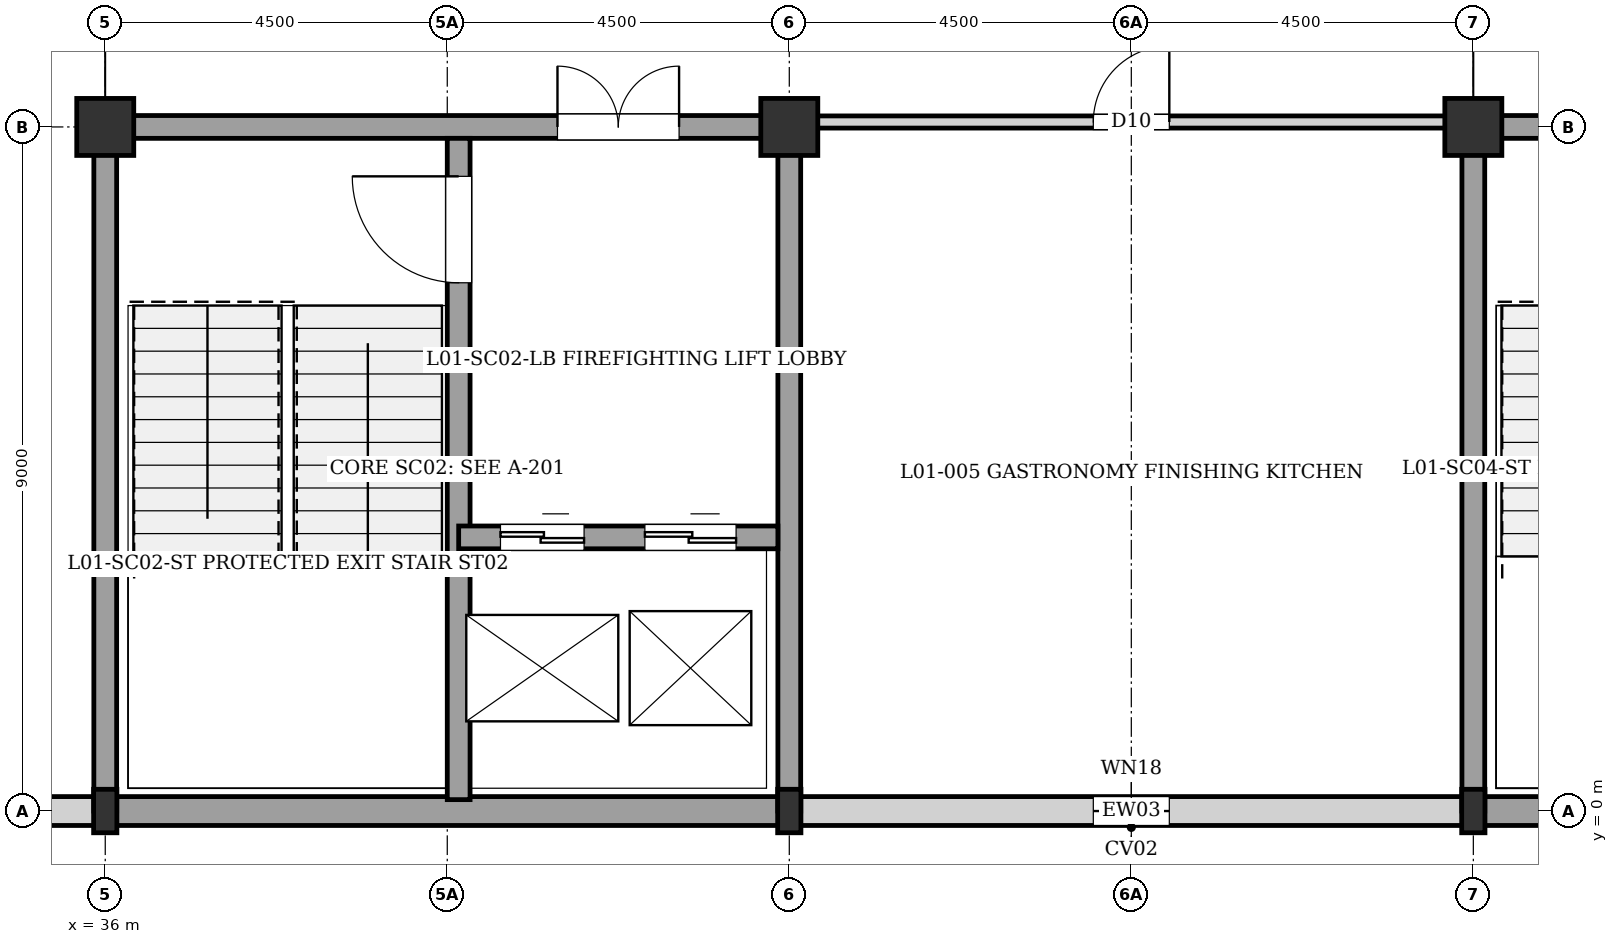
"""IFC4 building model, lengths in metres.
Left out: names, types, materials, properties, quantities, classifications, styles, units other than length and angle.
Written with IfcOpenShell. Run it as: python <this file> out.ifc"""

import sys

from ifc_helpers import new_model, si_unit, direction, frame, frame_2d, origin, origin_2d, place, context, subcontext, project, spatial, rectangle, i_section, extrude, element, fill, save


model = new_model("IFC4")
c1 = context("Model", 3, precision=1e-05, world=origin(), true_north=direction((0.0, 1.0)))
c2 = subcontext(c1, "Body", "Model", "MODEL_VIEW")
j1 = project(units=[si_unit("LENGTHUNIT", "METRE"), si_unit("PLANEANGLEUNIT", "RADIAN")], contexts=[c1])
p1 = place(None, origin())
s1 = spatial("IfcSite", under=j1, at=p1, CompositionType="ELEMENT")
p2 = place(p1, origin())
s2 = spatial("IfcBuilding", under=s1, at=p2, CompositionType="ELEMENT")
p3 = place(p2, frame((0.0, 0.0, 4.32)))
s3 = spatial("IfcBuildingStorey", under=s2, at=p3, CompositionType="ELEMENT", Elevation=4.32)
p4 = place(p3, frame((36.0, 0.0, 0.0), z_axis=(0.0, 0.0, 1.0), x_axis=(1.0, 0.0, 0.0)))
e1 = element("IfcColumn", 1, at=p4, inside=s3, PredefinedType="COLUMN", context=c2, shape_type="SweptSolid", body=[
    extrude(i_section(OverallWidth=0.306, OverallDepth=0.572, WebThickness=0.021, FlangeThickness=0.04, at=origin_2d()), origin(), (0.0, 0.0, 1.0), 3.84),
])
p5 = place(p3, frame((36.0, 9.0, 0.0), z_axis=(0.0, 0.0, 1.0), x_axis=(1.0, 0.0, 0.0)))
e2 = element("IfcColumn", 2, at=p5, inside=s3, PredefinedType="COLUMN", context=c2, shape_type="SweptSolid", body=[
    extrude(rectangle(XDim=0.75, YDim=0.75, at=origin_2d()), origin(), (0.0, 0.0, 1.0), 3.84),
])
p6 = place(p3, frame((45.0, 0.0, 0.0), z_axis=(0.0, 0.0, 1.0), x_axis=(1.0, 0.0, 0.0)))
e3 = element("IfcColumn", 3, at=p6, inside=s3, PredefinedType="COLUMN", context=c2, shape_type="SweptSolid", body=[
    extrude(i_section(OverallWidth=0.306, OverallDepth=0.572, WebThickness=0.021, FlangeThickness=0.04, at=origin_2d()), origin(), (0.0, 0.0, 1.0), 3.84),
])
p7 = place(p3, frame((45.0, 9.0, 0.0), z_axis=(0.0, 0.0, 1.0), x_axis=(1.0, 0.0, 0.0)))
e4 = element("IfcColumn", 4, at=p7, inside=s3, PredefinedType="COLUMN", context=c2, shape_type="SweptSolid", body=[
    extrude(rectangle(XDim=0.75, YDim=0.75, at=origin_2d()), origin(), (0.0, 0.0, 1.0), 3.84),
])
p8 = place(p3, frame((54.0, 0.0, 0.0), z_axis=(0.0, 0.0, 1.0), x_axis=(1.0, 0.0, 0.0)))
e5 = element("IfcColumn", 5, at=p8, inside=s3, PredefinedType="COLUMN", context=c2, shape_type="SweptSolid", body=[
    extrude(i_section(OverallWidth=0.306, OverallDepth=0.572, WebThickness=0.021, FlangeThickness=0.04, at=origin_2d()), origin(), (0.0, 0.0, 1.0), 3.84),
])
p9 = place(p3, frame((54.0, 9.0, 0.0), z_axis=(0.0, 0.0, 1.0), x_axis=(1.0, 0.0, 0.0)))
e6 = element("IfcColumn", 6, at=p9, inside=s3, PredefinedType="COLUMN", context=c2, shape_type="SweptSolid", body=[
    extrude(rectangle(XDim=0.75, YDim=0.75, at=origin_2d()), origin(), (0.0, 0.0, 1.0), 3.84),
])
p10 = place(p3, frame((63.0, 0.0, 0.0), z_axis=(0.0, 0.0, 1.0), x_axis=(-1.0, 0.0, 0.0)))
e7 = element("IfcWall", 7, at=p10, inside=s3, PredefinedType="SOLIDWALL", context=c2, shape_type="SweptSolid", body=[
    extrude(rectangle(XDim=9.0, YDim=0.38, at=frame_2d((4.5, 0.0))), origin(), (0.0, 0.0, 1.0), 3.6),
])
p11 = place(p3, frame((53.87, 0.0, 0.0), z_axis=(0.0, 0.0, 1.0), x_axis=(-1.0, 0.0, 0.0)))
e8 = element("IfcWall", 8, at=p11, inside=s3, PredefinedType="SOLIDWALL", context=c2, shape_type="SweptSolid", body=[
    extrude(rectangle(XDim=8.74, YDim=0.38, at=frame_2d((4.37, 0.0))), origin(), (0.0, 0.0, 1.0), 3.35),
])
p12 = place(p11, frame((3.87, 0.0, 0.4)))
e9 = element("IfcOpeningElement", 9, at=p12, cuts=e8, PredefinedType="OPENING", context=c2, shape_type="SweptSolid", body=[
    extrude(rectangle(XDim=1.0, YDim=1.6, at=frame_2d((0.5, 0.8))), frame((0.0, 0.2, 0.0), z_axis=(0.0, -1.0, 0.0), x_axis=(1.0, 0.0, 0.0)), (0.0, 0.0, 1.0), 0.4),
])
p13 = place(p3, frame((45.0, 0.0, 0.0), z_axis=(0.0, 0.0, 1.0), x_axis=(-1.0, 0.0, 0.0)))
e10 = element("IfcWall", 10, at=p13, inside=s3, PredefinedType="SOLIDWALL", context=c2, shape_type="SweptSolid", body=[
    extrude(rectangle(XDim=9.0, YDim=0.38, at=frame_2d((4.5, 0.0))), origin(), (0.0, 0.0, 1.0), 3.6),
])
p14 = place(p3, frame((35.87, 0.0, 0.0), z_axis=(0.0, 0.0, 1.0), x_axis=(-1.0, 0.0, 0.0)))
e11 = element("IfcWall", 11, at=p14, inside=s3, PredefinedType="SOLIDWALL", context=c2, shape_type="SweptSolid", body=[
    extrude(rectangle(XDim=8.87, YDim=0.38, at=frame_2d((4.435, 0.0))), origin(), (0.0, 0.0, 1.0), 2.18),
])
p15 = place(p3, frame((45.0, 0.0, 0.0), z_axis=(0.0, 0.0, 1.0), x_axis=(0.0, 1.0, 0.0)))
e12 = element("IfcWall", 12, at=p15, inside=s3, PredefinedType="SHEAR", context=c2, shape_type="SweptSolid", body=[
    extrude(rectangle(XDim=9.0, YDim=0.3, at=frame_2d((4.5, 0.0))), origin(), (0.0, 0.0, 1.0), 3.6),
])
p16 = place(p3, frame((36.0, 9.0, 0.0), z_axis=(0.0, 0.0, 1.0), x_axis=(1.0, 0.0, 0.0)))
e13 = element("IfcWall", 13, at=p16, inside=s3, PredefinedType="SHEAR", context=c2, shape_type="SweptSolid", body=[
    extrude(rectangle(XDim=9.0, YDim=0.3, at=frame_2d((4.5, 0.0))), origin(), (0.0, 0.0, 1.0), 3.6),
])
p17 = place(p16, frame((5.95, 0.0, 0.0)))
e14 = element("IfcOpeningElement", 14, at=p17, cuts=e13, PredefinedType="OPENING", context=c2, shape_type="SweptSolid", body=[
    extrude(rectangle(XDim=1.6, YDim=2.1, at=frame_2d((0.8, 1.05))), frame((0.0, 0.16, 0.0), z_axis=(0.0, -1.0, 0.0), x_axis=(1.0, 0.0, 0.0)), (0.0, 0.0, 1.0), 0.32),
])
p18 = place(p3, frame((36.0, 0.0, 0.0), z_axis=(0.0, 0.0, 1.0), x_axis=(0.0, 1.0, 0.0)))
e15 = element("IfcWall", 15, at=p18, inside=s3, PredefinedType="SHEAR", context=c2, shape_type="SweptSolid", body=[
    extrude(rectangle(XDim=9.0, YDim=0.3, at=frame_2d((4.5, 0.0))), origin(), (0.0, 0.0, 1.0), 3.6),
])
p19 = place(p3, frame((40.65, 0.15, 0.0), z_axis=(0.0, 0.0, 1.0), x_axis=(0.0, 1.0, 0.0)))
e16 = element("IfcWall", 16, at=p19, inside=s3, PredefinedType="SHEAR", context=c2, shape_type="SweptSolid", body=[
    extrude(rectangle(XDim=8.7, YDim=0.3, at=frame_2d((4.35, 0.0))), origin(), (0.0, 0.0, 1.0), 3.6),
])
p20 = place(p19, frame((6.8, 0.0, 0.0)))
e17 = element("IfcOpeningElement", 17, at=p20, cuts=e16, PredefinedType="OPENING", context=c2, shape_type="SweptSolid", body=[
    extrude(rectangle(XDim=1.4, YDim=2.02, at=frame_2d((0.7, 1.01))), frame((0.0, 0.16, 0.0), z_axis=(0.0, -1.0, 0.0), x_axis=(1.0, 0.0, 0.0)), (0.0, 0.0, 1.0), 0.32),
])
p21 = place(p3, frame((40.65, 3.6, 0.0), z_axis=(0.0, 0.0, 1.0), x_axis=(1.0, 0.0, 0.0)))
e18 = element("IfcWall", 18, at=p21, inside=s3, PredefinedType="SHEAR", context=c2, shape_type="SweptSolid", body=[
    extrude(rectangle(XDim=4.2, YDim=0.3, at=frame_2d((2.1, 0.0))), origin(), (0.0, 0.0, 1.0), 3.6),
])
p22 = place(p21, frame((0.55, 0.0, 0.0)))
e19 = element("IfcOpeningElement", 19, at=p22, cuts=e18, PredefinedType="OPENING", context=c2, shape_type="SweptSolid", body=[
    extrude(rectangle(XDim=1.1, YDim=2.1, at=frame_2d((0.55, 1.05))), frame((0.0, 0.16, 0.0), z_axis=(0.0, -1.0, 0.0), x_axis=(1.0, 0.0, 0.0)), (0.0, 0.0, 1.0), 0.32),
])
p23 = place(p21, frame((2.45, 0.0, 0.0)))
e20 = element("IfcOpeningElement", 20, at=p23, cuts=e18, PredefinedType="OPENING", context=c2, shape_type="SweptSolid", body=[
    extrude(rectangle(XDim=1.2, YDim=2.2, at=frame_2d((0.6, 1.1))), frame((0.0, 0.16, 0.0), z_axis=(0.0, -1.0, 0.0), x_axis=(1.0, 0.0, 0.0)), (0.0, 0.0, 1.0), 0.32),
])
p24 = place(p3, frame((54.0, 9.0, 0.0), z_axis=(0.0, 0.0, 1.0), x_axis=(1.0, 0.0, 0.0)))
e21 = element("IfcWall", 21, at=p24, inside=s3, PredefinedType="SHEAR", context=c2, shape_type="SweptSolid", body=[
    extrude(rectangle(XDim=9.0, YDim=0.3, at=frame_2d((4.5, 0.0))), origin(), (0.0, 0.0, 1.0), 3.6),
])
p25 = place(p24, frame((6.05, 0.0, 0.0)))
e22 = element("IfcOpeningElement", 22, at=p25, cuts=e21, PredefinedType="OPENING", context=c2, shape_type="SweptSolid", body=[
    extrude(rectangle(XDim=1.4, YDim=2.02, at=frame_2d((0.7, 1.01))), frame((0.0, 0.16, 0.0), z_axis=(0.0, -1.0, 0.0), x_axis=(1.0, 0.0, 0.0)), (0.0, 0.0, 1.0), 0.32),
])
p26 = place(p3, frame((54.0, 0.0, 0.0), z_axis=(0.0, 0.0, 1.0), x_axis=(0.0, 1.0, 0.0)))
e23 = element("IfcWall", 23, at=p26, inside=s3, PredefinedType="SHEAR", context=c2, shape_type="SweptSolid", body=[
    extrude(rectangle(XDim=9.0, YDim=0.3, at=frame_2d((4.5, 0.0))), origin(), (0.0, 0.0, 1.0), 3.6),
])
p27 = place(p3, frame((45.155, 9.065, 0.0), z_axis=(0.0, 0.0, 1.0), x_axis=(1.0, 0.0, 0.0)))
e24 = element("IfcWall", 24, at=p27, inside=s3, PredefinedType="PARTITIONING", context=c2, shape_type="SweptSolid", body=[
    extrude(rectangle(XDim=8.69, YDim=0.16, at=frame_2d((4.345, 0.0))), origin(), (0.0, 0.0, 1.0), 3.19),
])
p28 = place(p27, frame((3.845, 0.0, 0.0)))
e25 = element("IfcOpeningElement", 25, at=p28, cuts=e24, PredefinedType="OPENING", context=c2, shape_type="SweptSolid", body=[
    extrude(rectangle(XDim=1.0, YDim=2.1, at=frame_2d((0.5, 1.05))), frame((0.0, 0.09, 0.0), z_axis=(0.0, -1.0, 0.0), x_axis=(1.0, 0.0, 0.0)), (0.0, 0.0, 1.0), 0.18),
])
p29 = place(p12, origin())
e26 = element("IfcWindow", 26, at=p29, inside=s3, PartitioningType="SINGLE_PANEL", PredefinedType="WINDOW", context=c2, shape_type="SweptSolid", body=[
    extrude(rectangle(XDim=1.0, YDim=1.6, at=frame_2d((0.5, 0.8))), frame((0.0, 0.03, 0.0), z_axis=(0.0, -1.0, 0.0), x_axis=(1.0, 0.0, 0.0)), (0.0, 0.0, 1.0), 0.06),
])
fill(e9, e26)
p30 = place(p17, origin())
e27 = element("IfcDoor", 27, at=p30, inside=s3, OperationType="DOUBLE_DOOR_SINGLE_SWING", PredefinedType="DOOR", context=c2, shape_type="SweptSolid", body=[
    extrude(rectangle(XDim=1.6, YDim=2.1, at=frame_2d((0.8, 1.05))), frame((0.0, 0.025, 0.0), z_axis=(0.0, -1.0, 0.0), x_axis=(1.0, 0.0, 0.0)), (0.0, 0.0, 1.0), 0.05),
])
fill(e14, e27)
p31 = place(p20, origin())
e28 = element("IfcDoor", 28, at=p31, inside=s3, OperationType="SINGLE_SWING_RIGHT", PredefinedType="DOOR", context=c2, shape_type="SweptSolid", body=[
    extrude(rectangle(XDim=1.4, YDim=2.02, at=frame_2d((0.7, 1.01))), frame((0.0, 0.025, 0.0), z_axis=(0.0, -1.0, 0.0), x_axis=(1.0, 0.0, 0.0)), (0.0, 0.0, 1.0), 0.05),
])
fill(e17, e28)
p32 = place(p22, origin())
e29 = element("IfcDoor", 29, at=p32, inside=s3, OperationType="DOUBLE_DOOR_SLIDING", PredefinedType="DOOR", context=c2, shape_type="SweptSolid", body=[
    extrude(rectangle(XDim=1.1, YDim=2.1, at=frame_2d((0.55, 1.05))), frame((0.0, 0.025, 0.0), z_axis=(0.0, -1.0, 0.0), x_axis=(1.0, 0.0, 0.0)), (0.0, 0.0, 1.0), 0.05),
])
fill(e19, e29)
p33 = place(p23, origin())
e30 = element("IfcDoor", 30, at=p33, inside=s3, OperationType="DOUBLE_DOOR_SLIDING", PredefinedType="DOOR", context=c2, shape_type="SweptSolid", body=[
    extrude(rectangle(XDim=1.2, YDim=2.2, at=frame_2d((0.6, 1.1))), frame((0.0, 0.025, 0.0), z_axis=(0.0, -1.0, 0.0), x_axis=(1.0, 0.0, 0.0)), (0.0, 0.0, 1.0), 0.05),
])
fill(e20, e30)
p34 = place(p28, origin())
e31 = element("IfcDoor", 31, at=p34, inside=s3, OperationType="SINGLE_SWING_RIGHT", PredefinedType="DOOR", context=c2, shape_type="SweptSolid", body=[
    extrude(rectangle(XDim=1.0, YDim=2.1, at=frame_2d((0.5, 1.05))), frame((0.0, 0.025, 0.0), z_axis=(0.0, -1.0, 0.0), x_axis=(1.0, 0.0, 0.0)), (0.0, 0.0, 1.0), 0.05),
])
fill(e25, e31)
save(model, sys.argv[1])
